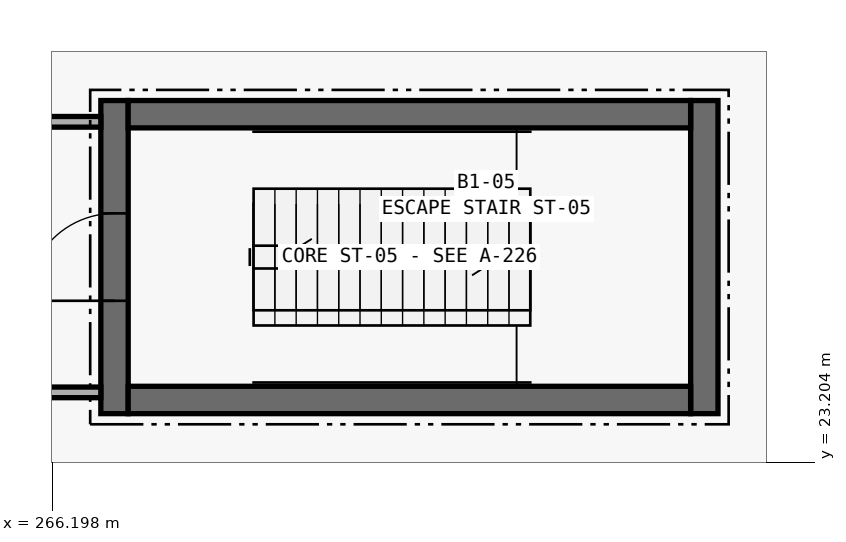
"""IFC4 building model, lengths in metres.
Left out: names, types, materials, properties, quantities, classifications, styles, units other than length and angle.
Written with IfcOpenShell. Run it as: python <this file> out.ifc"""

import sys

from ifc_helpers import new_model, si_unit, direction, frame, frame_2d, origin, place, context, subcontext, project, spatial, rectangle, extrude, element, fill, save


model = new_model("IFC4")
c1 = context("Model", 3, precision=1e-05, world=origin(), true_north=direction((0.0, 1.0)))
c2 = subcontext(c1, "Body", "Model", "MODEL_VIEW")
j1 = project(units=[si_unit("LENGTHUNIT", "METRE"), si_unit("PLANEANGLEUNIT", "RADIAN")], contexts=[c1])
p1 = place(None, origin())
s1 = spatial("IfcSite", under=j1, at=p1, CompositionType="ELEMENT")
p2 = place(p1, origin())
s2 = spatial("IfcBuilding", under=s1, at=p2, CompositionType="ELEMENT")
p3 = place(p2, frame((0.0, 0.0, -4.8)))
s3 = spatial("IfcBuildingStorey", under=s2, at=p3, CompositionType="ELEMENT", Elevation=-4.8)
p4 = place(p3, frame((267.02, 23.84, 0.0), z_axis=(0.0, 0.0, 1.0), x_axis=(0.0, 1.0, 0.0)))
e1 = element("IfcWall", 1, at=p4, inside=s3, PredefinedType="SHEAR", context=c2, shape_type="SweptSolid", body=[
    extrude(rectangle(XDim=4.12, YDim=0.36, at=frame_2d((2.06, 0.0))), origin(), (0.0, 0.0, 1.0), 4.38),
])
p5 = place(p4, frame((1.485, 0.0, 0.0)))
e2 = element("IfcOpeningElement", 2, at=p5, cuts=e1, PredefinedType="OPENING", context=c2, shape_type="SweptSolid", body=[
    extrude(rectangle(XDim=1.15, YDim=2.15, at=frame_2d((0.575, 1.075))), frame((0.0, 0.195, 0.0), z_axis=(0.0, -1.0, 0.0), x_axis=(1.0, 0.0, 0.0)), (0.0, 0.0, 1.0), 0.39),
])
p6 = place(p3, frame((274.78, 23.84, 0.0), z_axis=(0.0, 0.0, 1.0), x_axis=(0.0, 1.0, 0.0)))
e3 = element("IfcWall", 3, at=p6, inside=s3, PredefinedType="SHEAR", context=c2, shape_type="SweptSolid", body=[
    extrude(rectangle(XDim=4.12, YDim=0.36, at=frame_2d((2.06, 0.0))), origin(), (0.0, 0.0, 1.0), 4.38),
])
for number, where, z_axis, x_axis in (
    (4, (267.2, 27.78, 0.0), (0.0, 0.0, 1.0), (1.0, 0.0, 0.0)),
    (5, (267.2, 24.02, 0.0), (0.0, 0.0, 1.0), (1.0, 0.0, 0.0)),
):
    element("IfcWall", number, at=place(p3, frame(where, z_axis=z_axis, x_axis=x_axis)), inside=s3, PredefinedType="SHEAR", context=c2, shape_type="SweptSolid", body=[
        extrude(rectangle(XDim=7.4, YDim=0.36, at=frame_2d((3.7, 0.0))), origin(), (0.0, 0.0, 1.0), 4.38),
    ])
p7 = place(p3, frame((262.85, 24.12, 0.0), z_axis=(0.0, 0.0, 1.0), x_axis=(1.0, 0.0, 0.0)))
e6 = element("IfcWall", 6, at=p7, inside=s3, PredefinedType="PARTITIONING", context=c2, shape_type="SweptSolid", body=[
    extrude(rectangle(XDim=3.99, YDim=0.14, at=frame_2d((1.995, 0.0))), origin(), (0.0, 0.0, 1.0), 3.26),
])
p8 = place(p3, frame((265.71, 27.68, 0.0), z_axis=(0.0, 0.0, 1.0), x_axis=(1.0, 0.0, 0.0)))
e7 = element("IfcWall", 7, at=p8, inside=s3, PredefinedType="PARTITIONING", context=c2, shape_type="SweptSolid", body=[
    extrude(rectangle(XDim=1.13, YDim=0.14, at=frame_2d((0.565, 0.0))), origin(), (0.0, 0.0, 1.0), 3.26),
])
p9 = place(p5, origin())
e8 = element("IfcDoor", 8, at=p9, inside=s3, OperationType="SINGLE_SWING_LEFT", PredefinedType="DOOR", context=c2, shape_type="SweptSolid", body=[
    extrude(rectangle(XDim=1.15, YDim=2.15, at=frame_2d((0.575, 1.075))), frame((0.0, 0.025, 0.0), z_axis=(0.0, -1.0, 0.0), x_axis=(1.0, 0.0, 0.0)), (0.0, 0.0, 1.0), 0.05),
])
fill(e2, e8)
save(model, sys.argv[1])
